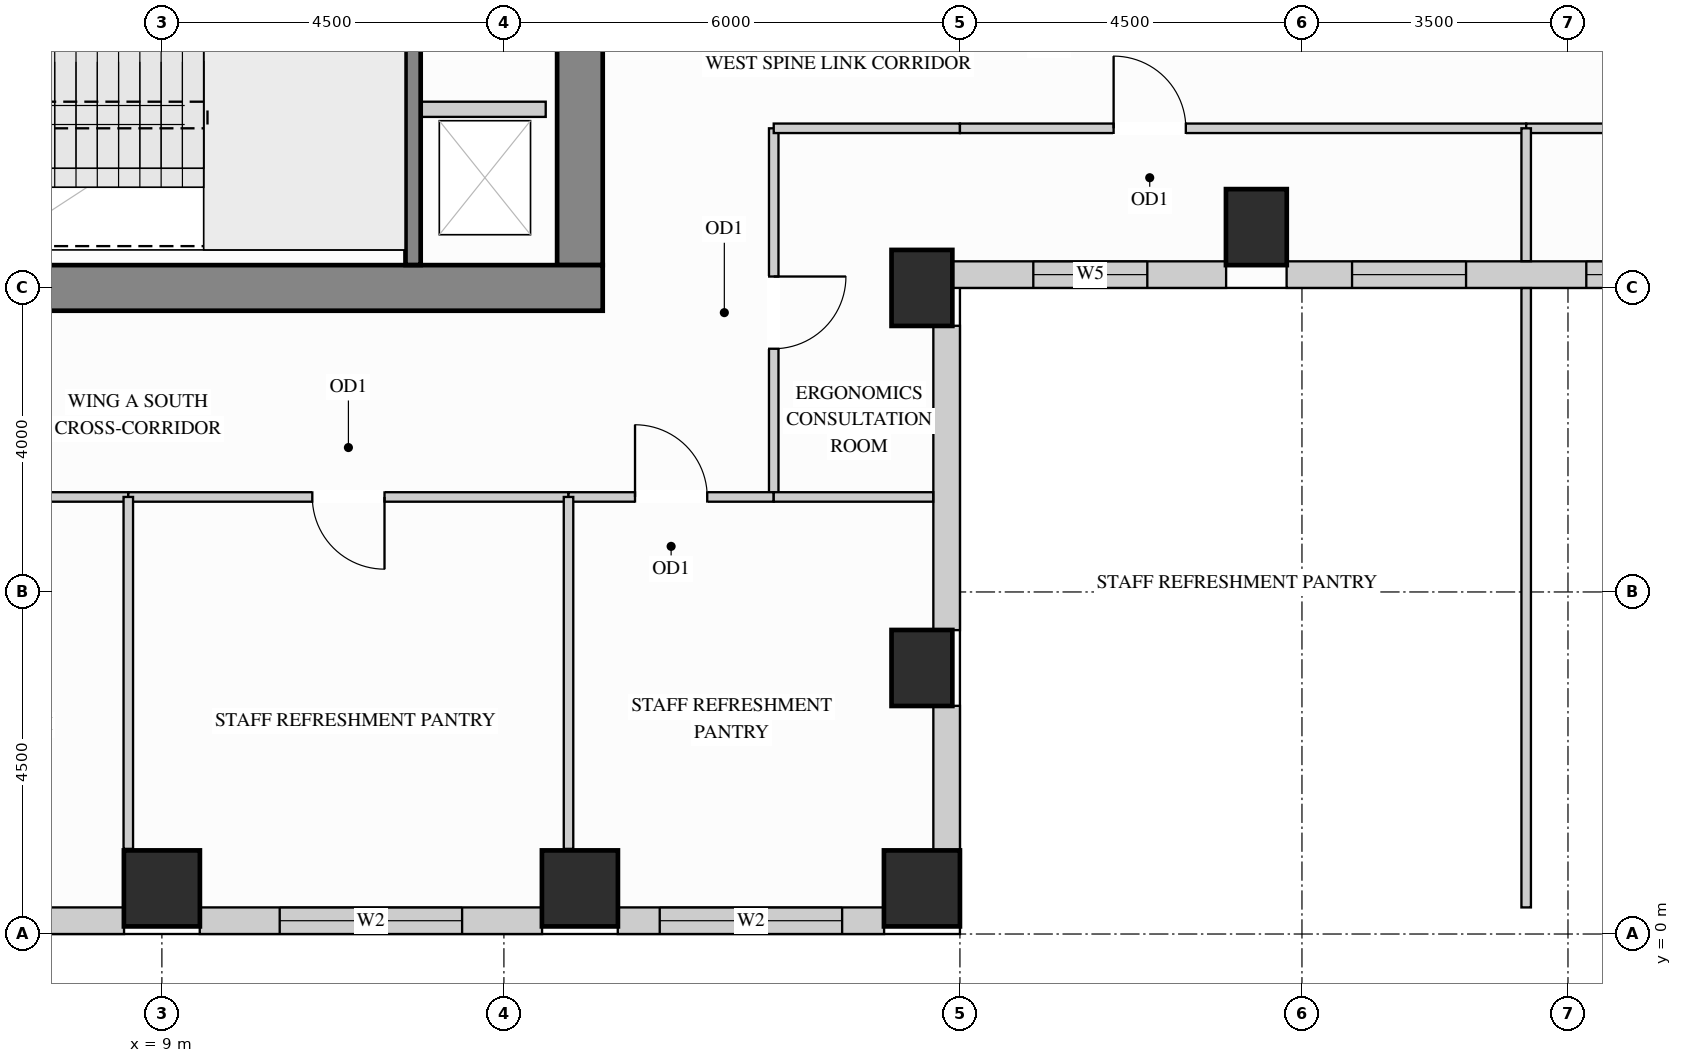
"""IFC4 building model, lengths in metres.
Left out: names, types, materials, properties, quantities, classifications, styles, units other than length and angle.
Written with IfcOpenShell. Run it as: python <this file> out.ifc"""

import sys

from ifc_helpers import new_model, si_unit, direction, frame, frame_2d, origin, origin_2d, place, context, subcontext, project, spatial, rectangle, extrude, source, transform, mapped, element, fill, save


model = new_model("IFC4")
c1 = context("Model", 3, precision=1e-05, world=origin(), true_north=direction((0.0, 1.0)))
c2 = subcontext(c1, "Body", "Model", "MODEL_VIEW")
j1 = project(units=[si_unit("LENGTHUNIT", "METRE"), si_unit("PLANEANGLEUNIT", "RADIAN")], contexts=[c1])
p1 = place(None, origin())
s1 = spatial("IfcSite", under=j1, at=p1, CompositionType="ELEMENT")
p2 = place(p1, origin())
s2 = spatial("IfcBuilding", under=s1, at=p2, CompositionType="ELEMENT")
p3 = place(p2, frame((0.0, 0.0, 182.7)))
s3 = spatial("IfcBuildingStorey", under=s2, at=p3, CompositionType="ELEMENT", Elevation=182.7)
m1 = source(origin(), c2, "Body", "SweptSolid", [
    extrude(rectangle(XDim=0.8, YDim=1.0, at=origin_2d()), origin(), (0.0, 0.0, 1.0), 3.4),
])
for number, where, z_axis, x_axis in (
    (1, (19.0, 3.5, 0.0), (0.0, 0.0, 1.0), (1.0, 0.0, 0.0)),
    (2, (19.0, 8.5, 0.0), (0.0, 0.0, 1.0), (1.0, 0.0, 0.0)),
    (3, (23.4, 9.3, 0.0), (0.0, 0.0, 1.0), (1.0, 0.0, 0.0)),
):
    element("IfcColumn", number, at=place(p3, frame(where, z_axis=z_axis, x_axis=x_axis)), inside=s3, PredefinedType="COLUMN", context=c2, shape_type="MappedRepresentation", body=[
        mapped(m1, transform((0.0, 0.0, 0.0), x_axis=(1.0, 0.0, 0.0), y_axis=(0.0, 1.0, 0.0), z_axis=(0.0, 0.0, 1.0))),
    ])
m2 = source(origin(), c2, "Body", "SweptSolid", [
    extrude(rectangle(XDim=1.0, YDim=1.0, at=origin_2d()), origin(), (0.0, 0.0, 1.0), 3.4),
])
for number, where, z_axis, x_axis in (
    (4, (14.5, 0.6, 0.0), (0.0, 0.0, 1.0), (1.0, 0.0, 0.0)),
    (5, (19.0, 0.6, 0.0), (0.0, 0.0, 1.0), (1.0, 0.0, 0.0)),
    (6, (9.0, 0.6, 0.0), (0.0, 0.0, 1.0), (1.0, 0.0, 0.0)),
):
    element("IfcColumn", number, at=place(p3, frame(where, z_axis=z_axis, x_axis=x_axis)), inside=s3, PredefinedType="COLUMN", context=c2, shape_type="MappedRepresentation", body=[
        mapped(m2, transform((0.0, 0.0, 0.0), x_axis=(1.0, 0.0, 0.0), y_axis=(0.0, 1.0, 0.0), z_axis=(0.0, 0.0, 1.0))),
    ])
m3 = source(origin(), c2, "Body", "SweptSolid", [
    extrude(rectangle(XDim=10.02, YDim=0.6, at=frame_2d((5.01, 0.0))), origin(), (0.0, 0.0, 1.0), 3.4),
])
p4 = place(p3, frame((14.5, 8.8, 0.0), z_axis=(0.0, 0.0, 1.0), x_axis=(0.0, 1.0, 0.0)))
e7 = element("IfcWall", 7, at=p4, inside=s3, PredefinedType="SHEAR", context=c2, shape_type="MappedRepresentation", body=[
    mapped(m3, transform((0.0, 0.0, 0.0), x_axis=(1.0, 0.0, 0.0), y_axis=(0.0, 1.0, 0.0), z_axis=(0.0, 0.0, 1.0))),
])
m4 = source(origin(), c2, "Body", "SweptSolid", [
    extrude(rectangle(XDim=10.6, YDim=0.6, at=frame_2d((5.3, 0.0))), origin(), (0.0, 0.0, 1.0), 3.4),
])
p5 = place(p3, frame((4.2, 8.5, 0.0), z_axis=(0.0, 0.0, 1.0), x_axis=(1.0, 0.0, 0.0)))
e8 = element("IfcWall", 8, at=p5, inside=s3, PredefinedType="SHEAR", context=c2, shape_type="MappedRepresentation", body=[
    mapped(m4, transform((0.0, 0.0, 0.0), x_axis=(1.0, 0.0, 0.0), y_axis=(0.0, 1.0, 0.0), z_axis=(0.0, 0.0, 1.0))),
])
p6 = place(p3, frame((3.998, 0.175, 0.0), z_axis=(0.0, 0.0, 1.0), x_axis=(1.0, 0.0, 0.0)))
e9 = element("IfcWall", 9, at=p6, inside=s3, PredefinedType="SOLIDWALL", context=c2, shape_type="SweptSolid", body=[
    extrude(rectangle(XDim=4.504, YDim=0.35, at=frame_2d((2.252, 0.0))), origin(), (0.0, 0.0, 1.0), 2.612),
])
p7 = place(p6, frame((1.052, 0.0, 0.78)))
e10 = element("IfcOpeningElement", 10, at=p7, cuts=e9, PredefinedType="OPENING", context=c2, shape_type="SweptSolid", body=[
    extrude(rectangle(XDim=2.4, YDim=1.652, at=frame_2d((1.2, 0.826))), frame((0.0, 0.185, 0.0), z_axis=(0.0, -1.0, 0.0), x_axis=(1.0, 0.0, 0.0)), (0.0, 0.0, 1.0), 0.37),
])
p8 = place(p3, frame((9.498, 0.175, 0.0), z_axis=(0.0, 0.0, 1.0), x_axis=(1.0, 0.0, 0.0)))
e11 = element("IfcWall", 11, at=p8, inside=s3, PredefinedType="SOLIDWALL", context=c2, shape_type="SweptSolid", body=[
    extrude(rectangle(XDim=4.504, YDim=0.35, at=frame_2d((2.252, 0.0))), origin(), (0.0, 0.0, 1.0), 2.612),
])
p9 = place(p8, frame((1.052, 0.0, 0.78)))
e12 = element("IfcOpeningElement", 12, at=p9, cuts=e11, PredefinedType="OPENING", context=c2, shape_type="SweptSolid", body=[
    extrude(rectangle(XDim=2.4, YDim=1.652, at=frame_2d((1.2, 0.826))), frame((0.0, 0.185, 0.0), z_axis=(0.0, -1.0, 0.0), x_axis=(1.0, 0.0, 0.0)), (0.0, 0.0, 1.0), 0.37),
])
p10 = place(p3, frame((14.998, 0.175, 0.0), z_axis=(0.0, 0.0, 1.0), x_axis=(1.0, 0.0, 0.0)))
e13 = element("IfcWall", 13, at=p10, inside=s3, PredefinedType="SOLIDWALL", context=c2, shape_type="SweptSolid", body=[
    extrude(rectangle(XDim=3.504, YDim=0.35, at=frame_2d((1.752, 0.0))), origin(), (0.0, 0.0, 1.0), 2.612),
])
p11 = place(p10, frame((0.552, 0.0, 0.78)))
e14 = element("IfcOpeningElement", 14, at=p11, cuts=e13, PredefinedType="OPENING", context=c2, shape_type="SweptSolid", body=[
    extrude(rectangle(XDim=2.4, YDim=1.652, at=frame_2d((1.2, 0.826))), frame((0.0, 0.185, 0.0), z_axis=(0.0, -1.0, 0.0), x_axis=(1.0, 0.0, 0.0)), (0.0, 0.0, 1.0), 0.37),
])
m5 = source(origin(), c2, "Body", "SweptSolid", [
    extrude(rectangle(XDim=1.904, YDim=0.35, at=frame_2d((0.952, 0.0))), origin(), (0.0, 0.0, 1.0), 2.612),
])
p12 = place(p3, frame((19.325, 1.098, 0.0), z_axis=(0.0, 0.0, 1.0), x_axis=(0.0, 1.0, 0.0)))
e15 = element("IfcWall", 15, at=p12, inside=s3, PredefinedType="SOLIDWALL", context=c2, shape_type="MappedRepresentation", body=[
    mapped(m5, transform((0.0, 0.0, 0.0), x_axis=(1.0, 0.0, 0.0), y_axis=(0.0, 1.0, 0.0), z_axis=(0.0, 0.0, 1.0))),
])
m6 = source(origin(), c2, "Body", "SweptSolid", [
    extrude(rectangle(XDim=4.004, YDim=0.35, at=frame_2d((2.002, 0.0))), origin(), (0.0, 0.0, 1.0), 2.612),
])
p13 = place(p3, frame((19.325, 3.998, 0.0), z_axis=(0.0, 0.0, 1.0), x_axis=(0.0, 1.0, 0.0)))
e16 = element("IfcWall", 16, at=p13, inside=s3, PredefinedType="SOLIDWALL", context=c2, shape_type="MappedRepresentation", body=[
    mapped(m6, transform((0.0, 0.0, 0.0), x_axis=(1.0, 0.0, 0.0), y_axis=(0.0, 1.0, 0.0), z_axis=(0.0, 0.0, 1.0))),
])
p14 = place(p3, frame((19.398, 8.675, 0.0), z_axis=(0.0, 0.0, 1.0), x_axis=(1.0, 0.0, 0.0)))
e17 = element("IfcWall", 17, at=p14, inside=s3, PredefinedType="SOLIDWALL", context=c2, shape_type="SweptSolid", body=[
    extrude(rectangle(XDim=3.604, YDim=0.35, at=frame_2d((1.802, 0.0))), origin(), (0.0, 0.0, 1.0), 3.385),
])
p15 = place(p14, frame((1.067, 0.0, 0.78)))
e18 = element("IfcOpeningElement", 18, at=p15, cuts=e17, PredefinedType="OPENING", context=c2, shape_type="SweptSolid", body=[
    extrude(rectangle(XDim=1.5, YDim=2.0, at=frame_2d((0.75, 1.0))), frame((0.0, 0.185, 0.0), z_axis=(0.0, -1.0, 0.0), x_axis=(1.0, 0.0, 0.0)), (0.0, 0.0, 1.0), 0.37),
])
p16 = place(p3, frame((23.798, 8.675, 0.0), z_axis=(0.0, 0.0, 1.0), x_axis=(1.0, 0.0, 0.0)))
e19 = element("IfcWall", 19, at=p16, inside=s3, PredefinedType="SOLIDWALL", context=c2, shape_type="SweptSolid", body=[
    extrude(rectangle(XDim=6.304, YDim=0.35, at=frame_2d((3.152, 0.0))), origin(), (0.0, 0.0, 1.0), 3.385),
])
p17 = place(p16, frame((0.861, 0.0, 0.78)))
e20 = element("IfcOpeningElement", 20, at=p17, cuts=e19, PredefinedType="OPENING", context=c2, shape_type="SweptSolid", body=[
    extrude(rectangle(XDim=1.5, YDim=2.0, at=frame_2d((0.75, 1.0))), frame((0.0, 0.185, 0.0), z_axis=(0.0, -1.0, 0.0), x_axis=(1.0, 0.0, 0.0)), (0.0, 0.0, 1.0), 0.37),
])
p18 = place(p16, frame((3.943, 0.0, 0.78)))
e21 = element("IfcOpeningElement", 21, at=p18, cuts=e19, PredefinedType="OPENING", context=c2, shape_type="SweptSolid", body=[
    extrude(rectangle(XDim=1.5, YDim=2.0, at=frame_2d((0.75, 1.0))), frame((0.0, 0.185, 0.0), z_axis=(0.0, -1.0, 0.0), x_axis=(1.0, 0.0, 0.0)), (0.0, 0.0, 1.0), 0.37),
])
p19 = place(p3, frame((17.05, 5.75, 0.0), z_axis=(0.0, 0.0, 1.0), x_axis=(0.0, 1.0, 0.0)))
e22 = element("IfcWall", 22, at=p19, inside=s3, PredefinedType="PARTITIONING", context=c2, shape_type="SweptSolid", body=[
    extrude(rectangle(XDim=4.85, YDim=0.125, at=frame_2d((2.425, 0.0))), origin(), (0.0, 0.0, 1.0), 3.385),
])
p20 = place(p19, frame((1.95, 0.0, 0.0)))
e23 = element("IfcOpeningElement", 23, at=p20, cuts=e22, PredefinedType="OPENING", context=c2, shape_type="SweptSolid", body=[
    extrude(rectangle(XDim=0.95, YDim=2.15, at=frame_2d((0.475, 1.075))), frame((0.0, 0.073, 0.0), z_axis=(0.0, -1.0, 0.0), x_axis=(1.0, 0.0, 0.0)), (0.0, 0.0, 1.0), 0.145),
])
m7 = source(origin(), c2, "Body", "SweptSolid", [
    extrude(rectangle(XDim=2.45, YDim=0.125, at=frame_2d((1.225, 0.0))), origin(), (0.0, 0.0, 1.0), 3.385),
])
p21 = place(p3, frame((17.05, 10.6, 0.0), z_axis=(0.0, 0.0, 1.0), x_axis=(1.0, 0.0, 0.0)))
e24 = element("IfcWall", 24, at=p21, inside=s3, PredefinedType="PARTITIONING", context=c2, shape_type="MappedRepresentation", body=[
    mapped(m7, transform((0.0, 0.0, 0.0), x_axis=(1.0, 0.0, 0.0), y_axis=(0.0, 1.0, 0.0), z_axis=(0.0, 0.0, 1.0))),
])
p22 = place(p3, frame((19.5, 10.6, 0.0), z_axis=(0.0, 0.0, 1.0), x_axis=(1.0, 0.0, 0.0)))
e25 = element("IfcWall", 25, at=p22, inside=s3, PredefinedType="PARTITIONING", context=c2, shape_type="SweptSolid", body=[
    extrude(rectangle(XDim=7.45, YDim=0.125, at=frame_2d((3.725, 0.0))), origin(), (0.0, 0.0, 1.0), 3.385),
])
p23 = place(p22, frame((2.022, 0.0, 0.0)))
e26 = element("IfcOpeningElement", 26, at=p23, cuts=e25, PredefinedType="OPENING", context=c2, shape_type="SweptSolid", body=[
    extrude(rectangle(XDim=0.95, YDim=2.15, at=frame_2d((0.475, 1.075))), frame((0.0, 0.073, 0.0), z_axis=(0.0, -1.0, 0.0), x_axis=(1.0, 0.0, 0.0)), (0.0, 0.0, 1.0), 0.145),
])
p24 = place(p3, frame((26.95, 10.6, 0.0), z_axis=(0.0, 0.0, 1.0), x_axis=(1.0, 0.0, 0.0)))
e27 = element("IfcWall", 27, at=p24, inside=s3, PredefinedType="PARTITIONING", context=c2, shape_type="SweptSolid", body=[
    extrude(rectangle(XDim=7.45, YDim=0.125, at=frame_2d((3.725, 0.0))), origin(), (0.0, 0.0, 1.0), 3.385),
])
p25 = place(p24, frame((4.478, 0.0, 0.0)))
e28 = element("IfcOpeningElement", 28, at=p25, cuts=e27, PredefinedType="OPENING", context=c2, shape_type="SweptSolid", body=[
    extrude(rectangle(XDim=0.95, YDim=2.15, at=frame_2d((0.475, 1.075))), frame((0.0, 0.073, 0.0), z_axis=(0.0, -1.0, 0.0), x_axis=(1.0, 0.0, 0.0)), (0.0, 0.0, 1.0), 0.145),
])
m8 = source(origin(), c2, "Body", "SweptSolid", [
    extrude(rectangle(XDim=8.148, YDim=0.125, at=frame_2d((4.074, 0.0))), origin(), (0.0, 0.0, 1.0), 3.385),
])
p26 = place(p3, frame((26.95, 0.35, 0.0), z_axis=(0.0, 0.0, 1.0), x_axis=(0.0, 1.0, 0.0)))
e29 = element("IfcWall", 29, at=p26, inside=s3, PredefinedType="PARTITIONING", context=c2, shape_type="MappedRepresentation", body=[
    mapped(m8, transform((0.0, 0.0, 0.0), x_axis=(1.0, 0.0, 0.0), y_axis=(0.0, 1.0, 0.0), z_axis=(0.0, 0.0, 1.0))),
])
m9 = source(origin(), c2, "Body", "SweptSolid", [
    extrude(rectangle(XDim=1.748, YDim=0.125, at=frame_2d((0.874, 0.0))), origin(), (0.0, 0.0, 1.0), 3.385),
])
p27 = place(p3, frame((26.95, 8.852, 0.0), z_axis=(0.0, 0.0, 1.0), x_axis=(0.0, 1.0, 0.0)))
e30 = element("IfcWall", 30, at=p27, inside=s3, PredefinedType="PARTITIONING", context=c2, shape_type="MappedRepresentation", body=[
    mapped(m9, transform((0.0, 0.0, 0.0), x_axis=(1.0, 0.0, 0.0), y_axis=(0.0, 1.0, 0.0), z_axis=(0.0, 0.0, 1.0))),
])
p28 = place(p3, frame((2.45, 5.75, 0.0), z_axis=(0.0, 0.0, 1.0), x_axis=(1.0, 0.0, 0.0)))
e31 = element("IfcWall", 31, at=p28, inside=s3, PredefinedType="PARTITIONING", context=c2, shape_type="SweptSolid", body=[
    extrude(rectangle(XDim=6.108, YDim=0.125, at=frame_2d((3.054, 0.0))), origin(), (0.0, 0.0, 1.0), 3.385),
])
p29 = place(p28, frame((2.579, 0.0, 0.0)))
e32 = element("IfcOpeningElement", 32, at=p29, cuts=e31, PredefinedType="OPENING", context=c2, shape_type="SweptSolid", body=[
    extrude(rectangle(XDim=0.95, YDim=2.15, at=frame_2d((0.475, 1.075))), frame((0.0, 0.073, 0.0), z_axis=(0.0, -1.0, 0.0), x_axis=(1.0, 0.0, 0.0)), (0.0, 0.0, 1.0), 0.145),
])
p30 = place(p3, frame((8.558, 5.75, 0.0), z_axis=(0.0, 0.0, 1.0), x_axis=(1.0, 0.0, 0.0)))
e33 = element("IfcWall", 33, at=p30, inside=s3, PredefinedType="PARTITIONING", context=c2, shape_type="SweptSolid", body=[
    extrude(rectangle(XDim=5.792, YDim=0.125, at=frame_2d((2.896, 0.0))), origin(), (0.0, 0.0, 1.0), 3.385),
])
p31 = place(p30, frame((2.421, 0.0, 0.0)))
e34 = element("IfcOpeningElement", 34, at=p31, cuts=e33, PredefinedType="OPENING", context=c2, shape_type="SweptSolid", body=[
    extrude(rectangle(XDim=0.95, YDim=2.15, at=frame_2d((0.475, 1.075))), frame((0.0, 0.073, 0.0), z_axis=(0.0, -1.0, 0.0), x_axis=(1.0, 0.0, 0.0)), (0.0, 0.0, 1.0), 0.145),
])
p32 = place(p3, frame((14.35, 5.75, 0.0), z_axis=(0.0, 0.0, 1.0), x_axis=(1.0, 0.0, 0.0)))
e35 = element("IfcWall", 35, at=p32, inside=s3, PredefinedType="PARTITIONING", context=c2, shape_type="SweptSolid", body=[
    extrude(rectangle(XDim=2.7, YDim=0.125, at=frame_2d((1.35, 0.0))), origin(), (0.0, 0.0, 1.0), 3.385),
])
p33 = place(p32, frame((0.875, 0.0, 0.0)))
e36 = element("IfcOpeningElement", 36, at=p33, cuts=e35, PredefinedType="OPENING", context=c2, shape_type="SweptSolid", body=[
    extrude(rectangle(XDim=0.95, YDim=2.15, at=frame_2d((0.475, 1.075))), frame((0.0, 0.073, 0.0), z_axis=(0.0, -1.0, 0.0), x_axis=(1.0, 0.0, 0.0)), (0.0, 0.0, 1.0), 0.145),
])
m10 = source(origin(), c2, "Body", "SweptSolid", [
    extrude(rectangle(XDim=2.098, YDim=0.125, at=frame_2d((1.049, 0.0))), origin(), (0.0, 0.0, 1.0), 3.385),
])
p34 = place(p3, frame((17.05, 5.75, 0.0), z_axis=(0.0, 0.0, 1.0), x_axis=(1.0, 0.0, 0.0)))
e37 = element("IfcWall", 37, at=p34, inside=s3, PredefinedType="PARTITIONING", context=c2, shape_type="MappedRepresentation", body=[
    mapped(m10, transform((0.0, 0.0, 0.0), x_axis=(1.0, 0.0, 0.0), y_axis=(0.0, 1.0, 0.0), z_axis=(0.0, 0.0, 1.0))),
])
m11 = source(origin(), c2, "Body", "SweptSolid", [
    extrude(rectangle(XDim=4.63, YDim=0.125, at=frame_2d((2.315, 0.0))), origin(), (0.0, 0.0, 1.0), 3.385),
])
for number, where, z_axis, x_axis in (
    (38, (8.558, 1.12, 0.0), (0.0, 0.0, 1.0), (0.0, 1.0, 0.0)),
    (39, (14.35, 1.12, 0.0), (0.0, 0.0, 1.0), (0.0, 1.0, 0.0)),
):
    element("IfcWall", number, at=place(p3, frame(where, z_axis=z_axis, x_axis=x_axis)), inside=s3, PredefinedType="PARTITIONING", context=c2, shape_type="MappedRepresentation", body=[
        mapped(m11, transform((0.0, 0.0, 0.0), x_axis=(1.0, 0.0, 0.0), y_axis=(0.0, 1.0, 0.0), z_axis=(0.0, 0.0, 1.0))),
    ])
m12 = source(origin(), c2, "Body", "SweptSolid", [
    extrude(rectangle(XDim=1.63, YDim=0.2, at=frame_2d((0.815, 0.0))), origin(), (0.0, 0.0, 1.0), 3.385),
])
p35 = place(p3, frame((12.42, 10.85, 0.0), z_axis=(0.0, 0.0, 1.0), x_axis=(1.0, 0.0, 0.0)))
e40 = element("IfcWall", 40, at=p35, inside=s3, PredefinedType="PARTITIONING", context=c2, shape_type="MappedRepresentation", body=[
    mapped(m12, transform((0.0, 0.0, 0.0), x_axis=(1.0, 0.0, 0.0), y_axis=(0.0, 1.0, 0.0), z_axis=(0.0, 0.0, 1.0))),
])
m13 = source(origin(), c2, "Body", "SweptSolid", [
    extrude(rectangle(XDim=3.753, YDim=0.2, at=frame_2d((1.876, 0.0))), origin(), (0.0, 0.0, 1.0), 3.4),
])
p36 = place(p3, frame((12.305, 8.802, 0.0), z_axis=(0.0, 0.0, 1.0), x_axis=(0.0, 1.0, 0.0)))
e41 = element("IfcWall", 41, at=p36, inside=s3, PredefinedType="SHEAR", context=c2, shape_type="MappedRepresentation", body=[
    mapped(m13, transform((0.0, 0.0, 0.0), x_axis=(1.0, 0.0, 0.0), y_axis=(0.0, 1.0, 0.0), z_axis=(0.0, 0.0, 1.0))),
])
m14 = source(origin(), c2, "Body", "SweptSolid", [
    extrude(rectangle(XDim=0.95, YDim=2.15, at=frame_2d((0.475, 1.075))), frame((0.0, 0.025, 0.0), z_axis=(0.0, -1.0, 0.0), x_axis=(1.0, 0.0, 0.0)), (0.0, 0.0, 1.0), 0.05),
])
p37 = place(p20, origin())
e42 = element("IfcDoor", 42, at=p37, inside=s3, OperationType="SINGLE_SWING_RIGHT", PredefinedType="DOOR", context=c2, shape_type="MappedRepresentation", body=[
    mapped(m14, transform((0.0, 0.0, 0.0), x_axis=(1.0, 0.0, 0.0), y_axis=(0.0, 1.0, 0.0), z_axis=(0.0, 0.0, 1.0))),
])
fill(e23, e42)
p38 = place(p31, origin())
e43 = element("IfcDoor", 43, at=p38, inside=s3, OperationType="SINGLE_SWING_RIGHT", PredefinedType="DOOR", context=c2, shape_type="MappedRepresentation", body=[
    mapped(m14, transform((0.0, 0.0, 0.0), x_axis=(1.0, 0.0, 0.0), y_axis=(0.0, 1.0, 0.0), z_axis=(0.0, 0.0, 1.0))),
])
fill(e34, e43)
p39 = place(p33, origin())
e44 = element("IfcDoor", 44, at=p39, inside=s3, OperationType="SINGLE_SWING_LEFT", PredefinedType="DOOR", context=c2, shape_type="MappedRepresentation", body=[
    mapped(m14, transform((0.0, 0.0, 0.0), x_axis=(1.0, 0.0, 0.0), y_axis=(0.0, 1.0, 0.0), z_axis=(0.0, 0.0, 1.0))),
])
fill(e36, e44)
p40 = place(p23, origin())
e45 = element("IfcDoor", 45, at=p40, inside=s3, OperationType="SINGLE_SWING_LEFT", PredefinedType="DOOR", context=c2, shape_type="MappedRepresentation", body=[
    mapped(m14, transform((0.0, 0.0, 0.0), x_axis=(1.0, 0.0, 0.0), y_axis=(0.0, 1.0, 0.0), z_axis=(0.0, 0.0, 1.0))),
])
fill(e26, e45)
m15 = source(origin(), c2, "Body", "SweptSolid", [
    extrude(rectangle(XDim=2.4, YDim=1.652, at=frame_2d((1.2, 0.826))), frame((0.0, 0.03, 0.0), z_axis=(0.0, -1.0, 0.0), x_axis=(1.0, 0.0, 0.0)), (0.0, 0.0, 1.0), 0.06),
])
p41 = place(p9, origin())
e46 = element("IfcWindow", 46, at=p41, inside=s3, PartitioningType="SINGLE_PANEL", PredefinedType="WINDOW", context=c2, shape_type="MappedRepresentation", body=[
    mapped(m15, transform((0.0, 0.0, 0.0), x_axis=(1.0, 0.0, 0.0), y_axis=(0.0, 1.0, 0.0), z_axis=(0.0, 0.0, 1.0))),
])
fill(e12, e46)
p42 = place(p11, origin())
e47 = element("IfcWindow", 47, at=p42, inside=s3, PartitioningType="SINGLE_PANEL", PredefinedType="WINDOW", context=c2, shape_type="MappedRepresentation", body=[
    mapped(m15, transform((0.0, 0.0, 0.0), x_axis=(1.0, 0.0, 0.0), y_axis=(0.0, 1.0, 0.0), z_axis=(0.0, 0.0, 1.0))),
])
fill(e14, e47)
m16 = source(origin(), c2, "Body", "SweptSolid", [
    extrude(rectangle(XDim=1.5, YDim=2.0, at=frame_2d((0.75, 1.0))), frame((0.0, 0.03, 0.0), z_axis=(0.0, -1.0, 0.0), x_axis=(1.0, 0.0, 0.0)), (0.0, 0.0, 1.0), 0.06),
])
p43 = place(p15, origin())
e48 = element("IfcWindow", 48, at=p43, inside=s3, PartitioningType="SINGLE_PANEL", PredefinedType="WINDOW", context=c2, shape_type="MappedRepresentation", body=[
    mapped(m16, transform((0.0, 0.0, 0.0), x_axis=(1.0, 0.0, 0.0), y_axis=(0.0, 1.0, 0.0), z_axis=(0.0, 0.0, 1.0))),
])
fill(e18, e48)
p44 = place(p17, origin())
e49 = element("IfcWindow", 49, at=p44, inside=s3, PartitioningType="SINGLE_PANEL", PredefinedType="WINDOW", context=c2, shape_type="MappedRepresentation", body=[
    mapped(m16, transform((0.0, 0.0, 0.0), x_axis=(1.0, 0.0, 0.0), y_axis=(0.0, 1.0, 0.0), z_axis=(0.0, 0.0, 1.0))),
])
fill(e20, e49)
p45 = place(p18, origin())
e50 = element("IfcWindow", 50, at=p45, inside=s3, PartitioningType="SINGLE_PANEL", PredefinedType="WINDOW", context=c2, shape_type="MappedRepresentation", body=[
    mapped(m16, transform((0.0, 0.0, 0.0), x_axis=(1.0, 0.0, 0.0), y_axis=(0.0, 1.0, 0.0), z_axis=(0.0, 0.0, 1.0))),
])
fill(e21, e50)
save(model, sys.argv[1])
